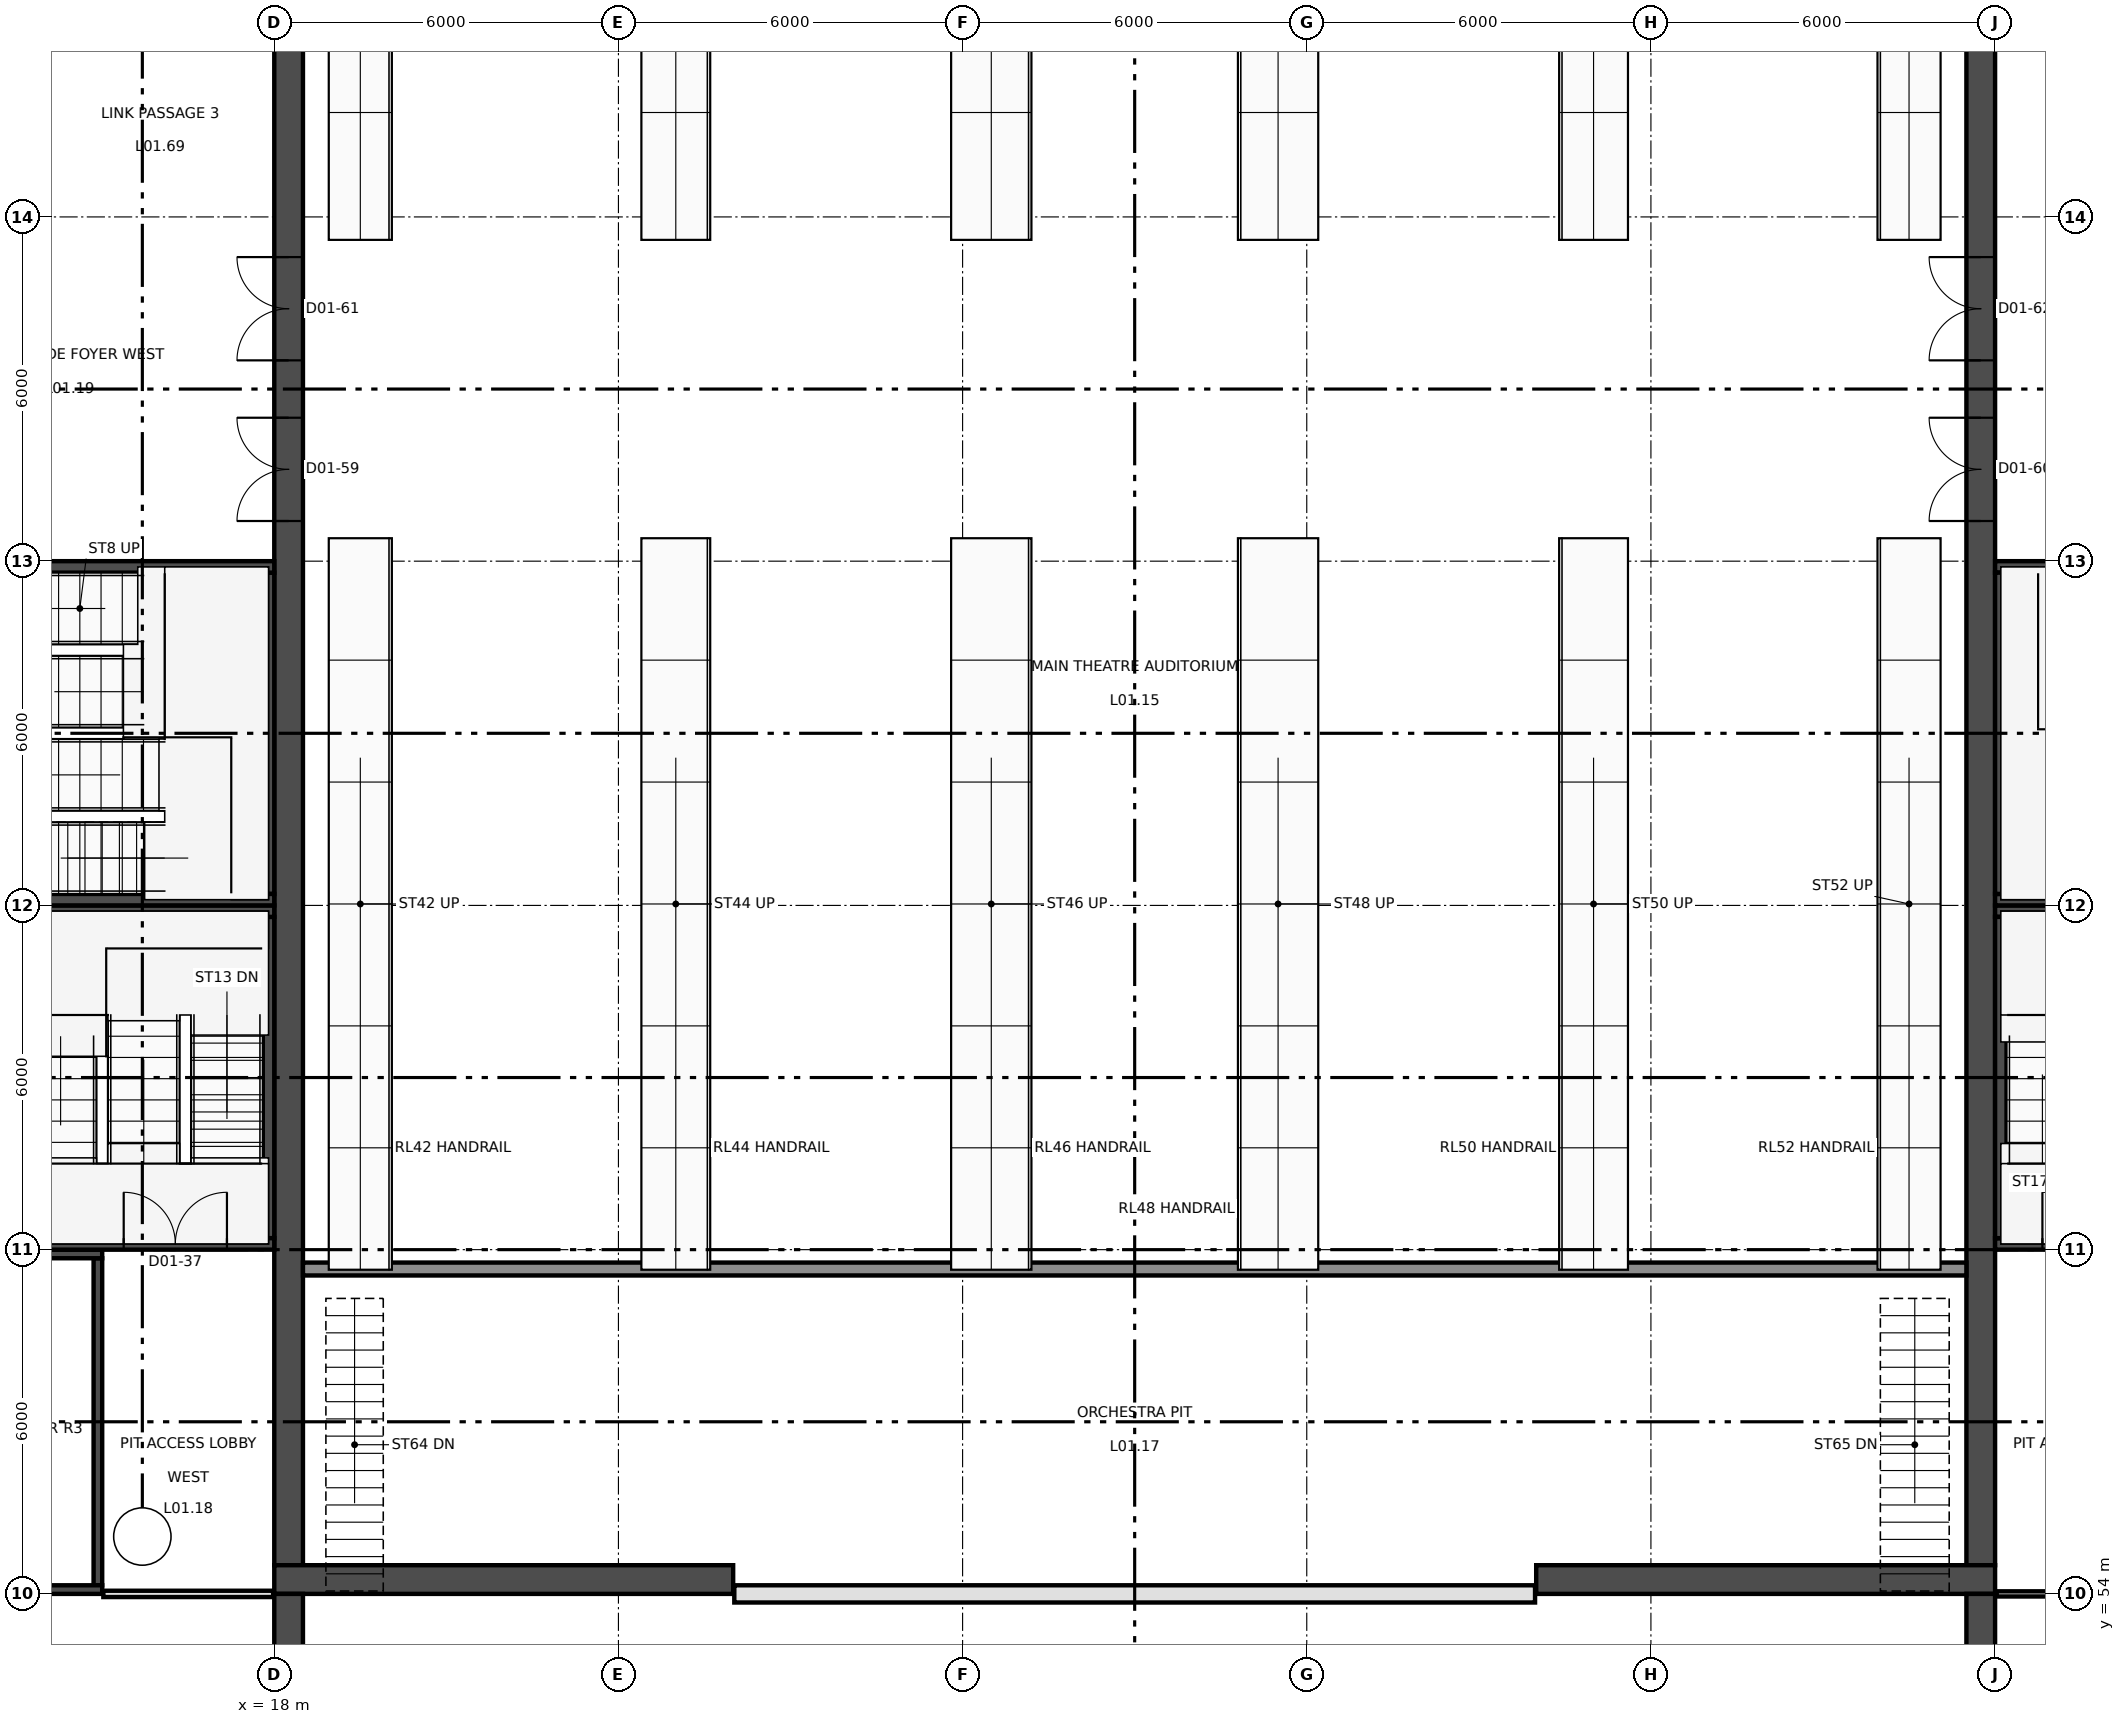
"""IFC4 building model, lengths in metres.
Left out: names, types, materials, properties, quantities, classifications, styles, units other than length and angle.
Written with IfcOpenShell. Run it as: python <this file> out.ifc"""

import sys

from ifc_helpers import new_model, si_unit, direction, frame, frame_2d, origin, place, context, subcontext, project, spatial, rectangle, extrude, element, fill, save


model = new_model("IFC4")
c1 = context("Model", 3, precision=1e-05, world=origin(), true_north=direction((0.0, 1.0)))
c2 = subcontext(c1, "Body", "Model", "MODEL_VIEW")
j1 = project(units=[si_unit("LENGTHUNIT", "METRE"), si_unit("PLANEANGLEUNIT", "RADIAN")], contexts=[c1])
p1 = place(None, origin())
s1 = spatial("IfcSite", under=j1, at=p1, CompositionType="ELEMENT")
p2 = place(p1, origin())
s2 = spatial("IfcBuilding", under=s1, at=p2, CompositionType="ELEMENT")
p3 = place(p2, frame((0.0, 0.0, 7.0)))
s3 = spatial("IfcBuildingStorey", under=s2, at=p3, CompositionType="ELEMENT", Elevation=7.0)
p4 = place(p3, frame((12.0, 71.9, 0.0), z_axis=(0.0, 0.0, 1.0), x_axis=(1.0, 0.0, 0.0)))
e1 = element("IfcWall", 1, at=p4, inside=s3, PredefinedType="SHEAR", context=c2, shape_type="SweptSolid", body=[
    extrude(rectangle(XDim=6.0, YDim=0.2, at=frame_2d((3.0, 0.0))), origin(), (0.0, 0.0, 1.0), 5.0),
])
p5 = place(p4, frame((0.3, 0.0, 0.0)))
e2 = element("IfcOpeningElement", 2, at=p5, cuts=e1, PredefinedType="OPENING", context=c2, shape_type="SweptSolid", body=[
    extrude(rectangle(XDim=1.1, YDim=2.2, at=frame_2d((0.55, 1.1))), frame((0.0, 0.11, 0.0), z_axis=(0.0, -1.0, 0.0), x_axis=(1.0, 0.0, 0.0)), (0.0, 0.0, 1.0), 0.22),
])
p6 = place(p3, frame((12.0, 66.1, 0.0), z_axis=(0.0, 0.0, 1.0), x_axis=(1.0, 0.0, 0.0)))
e3 = element("IfcWall", 3, at=p6, inside=s3, PredefinedType="SHEAR", context=c2, shape_type="SweptSolid", body=[
    extrude(rectangle(XDim=6.0, YDim=0.2, at=frame_2d((3.0, 0.0))), origin(), (0.0, 0.0, 1.0), 5.0),
])
p7 = place(p3, frame((17.9, 66.2, 0.0), z_axis=(0.0, 0.0, 1.0), x_axis=(0.0, 1.0, 0.0)))
e4 = element("IfcWall", 4, at=p7, inside=s3, PredefinedType="SHEAR", context=c2, shape_type="SweptSolid", body=[
    extrude(rectangle(XDim=5.6, YDim=0.2, at=frame_2d((2.8, 0.0))), origin(), (0.0, 0.0, 1.0), 5.0),
])
p8 = place(p3, frame((48.0, 71.9, 0.0), z_axis=(0.0, 0.0, 1.0), x_axis=(1.0, 0.0, 0.0)))
e5 = element("IfcWall", 5, at=p8, inside=s3, PredefinedType="SHEAR", context=c2, shape_type="SweptSolid", body=[
    extrude(rectangle(XDim=6.0, YDim=0.2, at=frame_2d((3.0, 0.0))), origin(), (0.0, 0.0, 1.0), 5.0),
])
p9 = place(p8, frame((4.6, 0.0, 0.0)))
e6 = element("IfcOpeningElement", 6, at=p9, cuts=e5, PredefinedType="OPENING", context=c2, shape_type="SweptSolid", body=[
    extrude(rectangle(XDim=1.1, YDim=2.2, at=frame_2d((0.55, 1.1))), frame((0.0, 0.11, 0.0), z_axis=(0.0, -1.0, 0.0), x_axis=(1.0, 0.0, 0.0)), (0.0, 0.0, 1.0), 0.22),
])
p10 = place(p3, frame((48.0, 66.1, 0.0), z_axis=(0.0, 0.0, 1.0), x_axis=(1.0, 0.0, 0.0)))
e7 = element("IfcWall", 7, at=p10, inside=s3, PredefinedType="SHEAR", context=c2, shape_type="SweptSolid", body=[
    extrude(rectangle(XDim=6.0, YDim=0.2, at=frame_2d((3.0, 0.0))), origin(), (0.0, 0.0, 1.0), 5.0),
])
p11 = place(p3, frame((48.1, 66.2, 0.0), z_axis=(0.0, 0.0, 1.0), x_axis=(0.0, 1.0, 0.0)))
e8 = element("IfcWall", 8, at=p11, inside=s3, PredefinedType="SHEAR", context=c2, shape_type="SweptSolid", body=[
    extrude(rectangle(XDim=5.6, YDim=0.2, at=frame_2d((2.8, 0.0))), origin(), (0.0, 0.0, 1.0), 5.0),
])
p12 = place(p3, frame((12.0, 65.9, 0.0), z_axis=(0.0, 0.0, 1.0), x_axis=(1.0, 0.0, 0.0)))
e9 = element("IfcWall", 9, at=p12, inside=s3, PredefinedType="SHEAR", context=c2, shape_type="SweptSolid", body=[
    extrude(rectangle(XDim=6.0, YDim=0.2, at=frame_2d((3.0, 0.0))), origin(), (0.0, 0.0, 1.0), 5.0),
])
p13 = place(p3, frame((12.0, 60.1, 0.0), z_axis=(0.0, 0.0, 1.0), x_axis=(1.0, 0.0, 0.0)))
e10 = element("IfcWall", 10, at=p13, inside=s3, PredefinedType="SHEAR", context=c2, shape_type="SweptSolid", body=[
    extrude(rectangle(XDim=6.0, YDim=0.2, at=frame_2d((3.0, 0.0))), origin(), (0.0, 0.0, 1.0), 5.0),
])
p14 = place(p13, frame((3.375, 0.0, 0.0)))
e11 = element("IfcOpeningElement", 11, at=p14, cuts=e10, PredefinedType="OPENING", context=c2, shape_type="SweptSolid", body=[
    extrude(rectangle(XDim=1.8, YDim=2.2, at=frame_2d((0.9, 1.1))), frame((0.0, 0.11, 0.0), z_axis=(0.0, -1.0, 0.0), x_axis=(1.0, 0.0, 0.0)), (0.0, 0.0, 1.0), 0.22),
])
p15 = place(p3, frame((17.9, 60.2, 0.0), z_axis=(0.0, 0.0, 1.0), x_axis=(0.0, 1.0, 0.0)))
e12 = element("IfcWall", 12, at=p15, inside=s3, PredefinedType="SHEAR", context=c2, shape_type="SweptSolid", body=[
    extrude(rectangle(XDim=5.6, YDim=0.2, at=frame_2d((2.8, 0.0))), origin(), (0.0, 0.0, 1.0), 5.0),
])
p16 = place(p3, frame((48.0, 65.9, 0.0), z_axis=(0.0, 0.0, 1.0), x_axis=(1.0, 0.0, 0.0)))
e13 = element("IfcWall", 13, at=p16, inside=s3, PredefinedType="SHEAR", context=c2, shape_type="SweptSolid", body=[
    extrude(rectangle(XDim=6.0, YDim=0.2, at=frame_2d((3.0, 0.0))), origin(), (0.0, 0.0, 1.0), 5.0),
])
p17 = place(p3, frame((48.0, 60.1, 0.0), z_axis=(0.0, 0.0, 1.0), x_axis=(1.0, 0.0, 0.0)))
e14 = element("IfcWall", 14, at=p17, inside=s3, PredefinedType="SHEAR", context=c2, shape_type="SweptSolid", body=[
    extrude(rectangle(XDim=6.0, YDim=0.2, at=frame_2d((3.0, 0.0))), origin(), (0.0, 0.0, 1.0), 5.0),
])
p18 = place(p17, frame((0.825, 0.0, 0.0)))
e15 = element("IfcOpeningElement", 15, at=p18, cuts=e14, PredefinedType="OPENING", context=c2, shape_type="SweptSolid", body=[
    extrude(rectangle(XDim=1.8, YDim=2.2, at=frame_2d((0.9, 1.1))), frame((0.0, 0.11, 0.0), z_axis=(0.0, -1.0, 0.0), x_axis=(1.0, 0.0, 0.0)), (0.0, 0.0, 1.0), 0.22),
])
p19 = place(p3, frame((48.1, 60.2, 0.0), z_axis=(0.0, 0.0, 1.0), x_axis=(0.0, 1.0, 0.0)))
e16 = element("IfcWall", 16, at=p19, inside=s3, PredefinedType="SHEAR", context=c2, shape_type="SweptSolid", body=[
    extrude(rectangle(XDim=5.6, YDim=0.2, at=frame_2d((2.8, 0.0))), origin(), (0.0, 0.0, 1.0), 5.0),
])
for number, where, z_axis, x_axis in (
    (17, (12.0, 59.925, 0.0), (0.0, 0.0, 1.0), (1.0, 0.0, 0.0)),
    (18, (12.0, 54.075, 0.0), (0.0, 0.0, 1.0), (1.0, 0.0, 0.0)),
):
    element("IfcWall", number, at=place(p3, frame(where, z_axis=z_axis, x_axis=x_axis)), inside=s3, PredefinedType="SHEAR", context=c2, shape_type="SweptSolid", body=[
        extrude(rectangle(XDim=3.0, YDim=0.15, at=frame_2d((1.5, 0.0))), origin(), (0.0, 0.0, 1.0), 5.0),
    ])
p20 = place(p3, frame((14.925, 54.15, 0.0), z_axis=(0.0, 0.0, 1.0), x_axis=(0.0, 1.0, 0.0)))
e19 = element("IfcWall", 19, at=p20, inside=s3, PredefinedType="SHEAR", context=c2, shape_type="SweptSolid", body=[
    extrude(rectangle(XDim=5.7, YDim=0.15, at=frame_2d((2.85, 0.0))), origin(), (0.0, 0.0, 1.0), 5.0),
])
p21 = place(p3, frame((18.25, 54.5, 0.0), z_axis=(0.0, 0.0, 1.0), x_axis=(0.0, 1.0, 0.0)))
e20 = element("IfcWall", 20, at=p21, inside=s3, PredefinedType="SHEAR", context=c2, shape_type="SweptSolid", body=[
    extrude(rectangle(XDim=35.5, YDim=0.5, at=frame_2d((17.75, 0.0))), origin(), (0.0, 0.0, 1.0), 5.0),
])
p22 = place(p21, frame((18.2, 0.0, 0.0)))
e21 = element("IfcOpeningElement", 21, at=p22, cuts=e20, PredefinedType="OPENING", context=c2, shape_type="SweptSolid", body=[
    extrude(rectangle(XDim=1.8, YDim=2.4, at=frame_2d((0.9, 1.2))), frame((0.0, 0.26, 0.0), z_axis=(0.0, -1.0, 0.0), x_axis=(1.0, 0.0, 0.0)), (0.0, 0.0, 1.0), 0.52),
])
p23 = place(p21, frame((21.0, 0.0, 0.0)))
e22 = element("IfcOpeningElement", 22, at=p23, cuts=e20, PredefinedType="OPENING", context=c2, shape_type="SweptSolid", body=[
    extrude(rectangle(XDim=1.8, YDim=2.4, at=frame_2d((0.9, 1.2))), frame((0.0, 0.26, 0.0), z_axis=(0.0, -1.0, 0.0), x_axis=(1.0, 0.0, 0.0)), (0.0, 0.0, 1.0), 0.52),
])
p24 = place(p3, frame((18.25, 30.0, 0.0), z_axis=(0.0, 0.0, 1.0), x_axis=(0.0, 1.0, 0.0)))
e23 = element("IfcWall", 23, at=p24, inside=s3, PredefinedType="SHEAR", context=c2, shape_type="SweptSolid", body=[
    extrude(rectangle(XDim=24.0, YDim=0.5, at=frame_2d((12.0, 0.0))), origin(), (0.0, 0.0, 1.0), 5.0),
])
p25 = place(p24, frame((2.25, 0.0, 0.0)))
e24 = element("IfcOpeningElement", 24, at=p25, cuts=e23, PredefinedType="OPENING", context=c2, shape_type="SweptSolid", body=[
    extrude(rectangle(XDim=1.5, YDim=2.1, at=frame_2d((0.75, 1.05))), frame((0.0, 0.26, 0.0), z_axis=(0.0, -1.0, 0.0), x_axis=(1.0, 0.0, 0.0)), (0.0, 0.0, 1.0), 0.52),
])
p26 = place(p24, frame((14.25, 0.0, 0.0)))
e25 = element("IfcOpeningElement", 25, at=p26, cuts=e23, PredefinedType="OPENING", context=c2, shape_type="SweptSolid", body=[
    extrude(rectangle(XDim=1.5, YDim=2.1, at=frame_2d((0.75, 1.05))), frame((0.0, 0.26, 0.0), z_axis=(0.0, -1.0, 0.0), x_axis=(1.0, 0.0, 0.0)), (0.0, 0.0, 1.0), 0.52),
])
p27 = place(p3, frame((47.75, 54.5, 0.0), z_axis=(0.0, 0.0, 1.0), x_axis=(0.0, 1.0, 0.0)))
e26 = element("IfcWall", 26, at=p27, inside=s3, PredefinedType="SHEAR", context=c2, shape_type="SweptSolid", body=[
    extrude(rectangle(XDim=35.5, YDim=0.5, at=frame_2d((17.75, 0.0))), origin(), (0.0, 0.0, 1.0), 5.0),
])
p28 = place(p27, frame((18.2, 0.0, 0.0)))
e27 = element("IfcOpeningElement", 27, at=p28, cuts=e26, PredefinedType="OPENING", context=c2, shape_type="SweptSolid", body=[
    extrude(rectangle(XDim=1.8, YDim=2.4, at=frame_2d((0.9, 1.2))), frame((0.0, 0.26, 0.0), z_axis=(0.0, -1.0, 0.0), x_axis=(1.0, 0.0, 0.0)), (0.0, 0.0, 1.0), 0.52),
])
p29 = place(p27, frame((21.0, 0.0, 0.0)))
e28 = element("IfcOpeningElement", 28, at=p29, cuts=e26, PredefinedType="OPENING", context=c2, shape_type="SweptSolid", body=[
    extrude(rectangle(XDim=1.8, YDim=2.4, at=frame_2d((0.9, 1.2))), frame((0.0, 0.26, 0.0), z_axis=(0.0, -1.0, 0.0), x_axis=(1.0, 0.0, 0.0)), (0.0, 0.0, 1.0), 0.52),
])
p30 = place(p3, frame((47.75, 30.0, 0.0), z_axis=(0.0, 0.0, 1.0), x_axis=(0.0, 1.0, 0.0)))
e29 = element("IfcWall", 29, at=p30, inside=s3, PredefinedType="SHEAR", context=c2, shape_type="SweptSolid", body=[
    extrude(rectangle(XDim=24.0, YDim=0.5, at=frame_2d((12.0, 0.0))), origin(), (0.0, 0.0, 1.0), 5.0),
])
p31 = place(p30, frame((2.25, 0.0, 0.0)))
e30 = element("IfcOpeningElement", 30, at=p31, cuts=e29, PredefinedType="OPENING", context=c2, shape_type="SweptSolid", body=[
    extrude(rectangle(XDim=1.5, YDim=2.1, at=frame_2d((0.75, 1.05))), frame((0.0, 0.26, 0.0), z_axis=(0.0, -1.0, 0.0), x_axis=(1.0, 0.0, 0.0)), (0.0, 0.0, 1.0), 0.52),
])
p32 = place(p30, frame((14.25, 0.0, 0.0)))
e31 = element("IfcOpeningElement", 31, at=p32, cuts=e29, PredefinedType="OPENING", context=c2, shape_type="SweptSolid", body=[
    extrude(rectangle(XDim=1.5, YDim=2.1, at=frame_2d((0.75, 1.05))), frame((0.0, 0.26, 0.0), z_axis=(0.0, -1.0, 0.0), x_axis=(1.0, 0.0, 0.0)), (0.0, 0.0, 1.0), 0.52),
])
for number, where, z_axis, x_axis in (
    (32, (18.0, 54.25, 0.0), (0.0, 0.0, 1.0), (1.0, 0.0, 0.0)),
    (33, (40.0, 54.25, 0.0), (0.0, 0.0, 1.0), (1.0, 0.0, 0.0)),
):
    element("IfcWall", number, at=place(p3, frame(where, z_axis=z_axis, x_axis=x_axis)), inside=s3, PredefinedType="SHEAR", context=c2, shape_type="SweptSolid", body=[
        extrude(rectangle(XDim=8.0, YDim=0.5, at=frame_2d((4.0, 0.0))), origin(), (0.0, 0.0, 1.0), 5.0),
    ])
p33 = place(p3, frame((18.5, 59.663, -1.238), z_axis=(0.0, 0.0, 1.0), x_axis=(1.0, 0.0, 0.0)))
e34 = element("IfcWall", 34, at=p33, inside=s3, PredefinedType="SOLIDWALL", context=c2, shape_type="SweptSolid", body=[
    extrude(rectangle(XDim=29.0, YDim=0.225, at=frame_2d((14.5, 0.0))), origin(), (0.0, 0.0, 1.0), 1.1),
])
p34 = place(p3, frame((26.02, 54.0, 0.0), z_axis=(0.0, 0.0, 1.0), x_axis=(1.0, 0.0, 0.0)))
e35 = element("IfcWall", 35, at=p34, inside=s3, PredefinedType="PARTITIONING", context=c2, shape_type="SweptSolid", body=[
    extrude(rectangle(XDim=13.96, YDim=0.3, at=frame_2d((6.98, 0.0))), origin(), (0.0, 0.0, 1.0), 5.0),
])
p35 = place(p3, frame((15.02, 54.0, 0.0), z_axis=(0.0, 0.0, 1.0), x_axis=(1.0, 0.0, 0.0)))
e36 = element("IfcWall", 36, at=p35, inside=s3, PredefinedType="PARTITIONING", context=c2, shape_type="SweptSolid", body=[
    extrude(rectangle(XDim=2.96, YDim=0.11, at=frame_2d((1.48, 0.0))), origin(), (0.0, 0.0, 1.0), 4.15),
])
p36 = place(p3, frame((48.02, 54.0, 0.0), z_axis=(0.0, 0.0, 1.0), x_axis=(1.0, 0.0, 0.0)))
e37 = element("IfcWall", 37, at=p36, inside=s3, PredefinedType="PARTITIONING", context=c2, shape_type="SweptSolid", body=[
    extrude(rectangle(XDim=2.96, YDim=0.09, at=frame_2d((1.48, 0.0))), origin(), (0.0, 0.0, 1.0), 4.15),
])
p37 = place(p14, origin())
e38 = element("IfcDoor", 38, at=p37, inside=s3, OperationType="DOUBLE_DOOR_SINGLE_SWING", PredefinedType="DOOR", context=c2, shape_type="SweptSolid", body=[
    extrude(rectangle(XDim=1.8, YDim=2.2, at=frame_2d((0.9, 1.1))), frame((0.0, 0.025, 0.0), z_axis=(0.0, -1.0, 0.0), x_axis=(1.0, 0.0, 0.0)), (0.0, 0.0, 1.0), 0.05),
])
fill(e11, e38)
p38 = place(p18, origin())
e39 = element("IfcDoor", 39, at=p38, inside=s3, OperationType="DOUBLE_DOOR_SINGLE_SWING", PredefinedType="DOOR", context=c2, shape_type="SweptSolid", body=[
    extrude(rectangle(XDim=1.8, YDim=2.2, at=frame_2d((0.9, 1.1))), frame((0.0, 0.025, 0.0), z_axis=(0.0, -1.0, 0.0), x_axis=(1.0, 0.0, 0.0)), (0.0, 0.0, 1.0), 0.05),
])
fill(e15, e39)
p39 = place(p22, origin())
e40 = element("IfcDoor", 40, at=p39, inside=s3, OperationType="DOUBLE_DOOR_SINGLE_SWING", PredefinedType="DOOR", context=c2, shape_type="SweptSolid", body=[
    extrude(rectangle(XDim=1.8, YDim=2.4, at=frame_2d((0.9, 1.2))), frame((0.0, 0.025, 0.0), z_axis=(0.0, -1.0, 0.0), x_axis=(1.0, 0.0, 0.0)), (0.0, 0.0, 1.0), 0.05),
])
fill(e21, e40)
p40 = place(p28, frame((1.8, 0.0, 0.0), z_axis=(0.0, 0.0, 1.0), x_axis=(-1.0, 0.0, 0.0)))
e41 = element("IfcDoor", 41, at=p40, inside=s3, OperationType="DOUBLE_DOOR_SINGLE_SWING", PredefinedType="DOOR", context=c2, shape_type="SweptSolid", body=[
    extrude(rectangle(XDim=1.8, YDim=2.4, at=frame_2d((0.9, 1.2))), frame((0.0, 0.025, 0.0), z_axis=(0.0, -1.0, 0.0), x_axis=(1.0, 0.0, 0.0)), (0.0, 0.0, 1.0), 0.05),
])
fill(e27, e41)
p41 = place(p23, origin())
e42 = element("IfcDoor", 42, at=p41, inside=s3, OperationType="DOUBLE_DOOR_SINGLE_SWING", PredefinedType="DOOR", context=c2, shape_type="SweptSolid", body=[
    extrude(rectangle(XDim=1.8, YDim=2.4, at=frame_2d((0.9, 1.2))), frame((0.0, 0.025, 0.0), z_axis=(0.0, -1.0, 0.0), x_axis=(1.0, 0.0, 0.0)), (0.0, 0.0, 1.0), 0.05),
])
fill(e22, e42)
p42 = place(p29, frame((1.8, 0.0, 0.0), z_axis=(0.0, 0.0, 1.0), x_axis=(-1.0, 0.0, 0.0)))
e43 = element("IfcDoor", 43, at=p42, inside=s3, OperationType="DOUBLE_DOOR_SINGLE_SWING", PredefinedType="DOOR", context=c2, shape_type="SweptSolid", body=[
    extrude(rectangle(XDim=1.8, YDim=2.4, at=frame_2d((0.9, 1.2))), frame((0.0, 0.025, 0.0), z_axis=(0.0, -1.0, 0.0), x_axis=(1.0, 0.0, 0.0)), (0.0, 0.0, 1.0), 0.05),
])
fill(e28, e43)
save(model, sys.argv[1])
